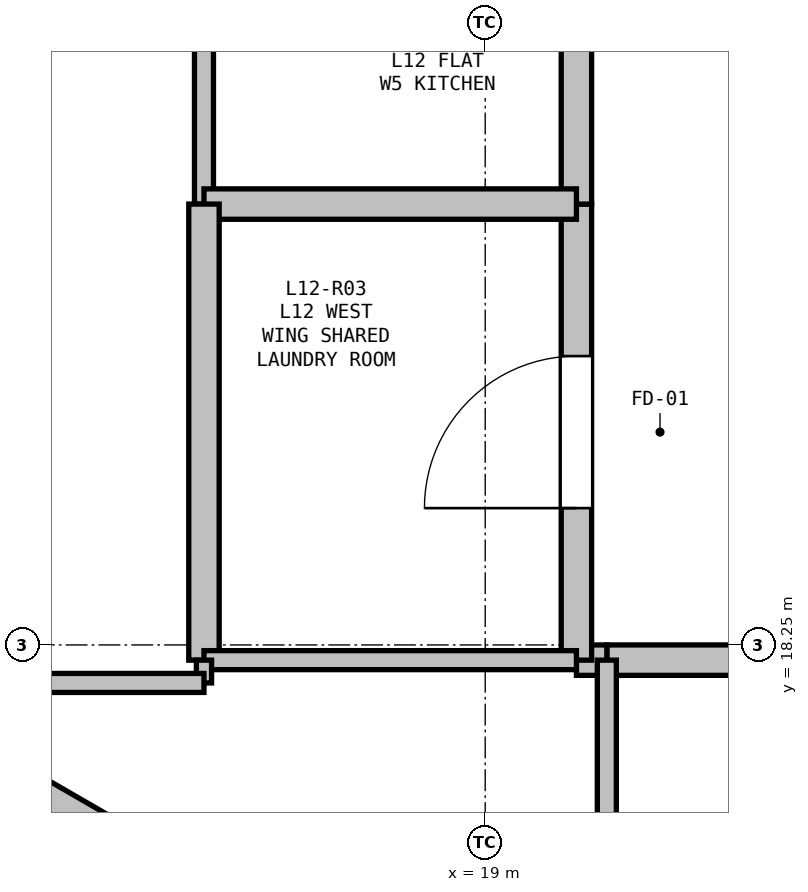
"""IFC4 building model, lengths in metres.
Left out: names, types, materials, properties, quantities, classifications, styles, units other than length and angle.
Written with IfcOpenShell. Run it as: python <this file> out.ifc"""

import sys

from ifc_helpers import new_model, si_unit, direction, frame, frame_2d, origin, place, context, subcontext, project, spatial, rectangle, extrude, element, fill, save


model = new_model("IFC4")
c1 = context("Model", 3, precision=1e-05, world=origin(), true_north=direction((0.0, 1.0)))
c2 = subcontext(c1, "Body", "Model", "MODEL_VIEW")
j1 = project(units=[si_unit("LENGTHUNIT", "METRE"), si_unit("PLANEANGLEUNIT", "RADIAN")], contexts=[c1])
p1 = place(None, origin())
s1 = spatial("IfcSite", under=j1, at=p1, CompositionType="ELEMENT")
p2 = place(p1, origin())
s2 = spatial("IfcBuilding", under=s1, at=p2, CompositionType="ELEMENT")
p3 = place(p2, frame((0.0, 0.0, 45.6)))
s3 = spatial("IfcBuildingStorey", under=s2, at=p3, CompositionType="ELEMENT", Elevation=45.6)
p4 = place(p3, frame((16.48, 17.039, 0.0), z_axis=(0.0, 0.0, 1.0), x_axis=(-0.86605165483, 0.499954529098, 0.0)))
e1 = element("IfcWall", 1, at=p4, inside=s3, PredefinedType="PARAPET", context=c2, shape_type="SweptSolid", body=[
    extrude(rectangle(XDim=1.7, YDim=0.2, at=frame_2d((0.85, 0.0))), origin(), (0.0, 0.0, 1.0), 2.66),
])
p5 = place(p3, frame((22.6, 18.15, 0.0), z_axis=(0.0, 0.0, 1.0), x_axis=(-1.0, 0.0, 0.0)))
e2 = element("IfcWall", 2, at=p5, inside=s3, PredefinedType="PARTITIONING", context=c2, shape_type="SweptSolid", body=[
    extrude(rectangle(XDim=2.8, YDim=0.2, at=frame_2d((1.4, 0.0))), origin(), (0.0, 0.0, 1.0), 3.04),
])
p6 = place(p5, frame((0.9, 0.0, 0.0)))
e3 = element("IfcOpeningElement", 3, at=p6, cuts=e2, PredefinedType="OPENING", context=c2, shape_type="SweptSolid", body=[
    extrude(rectangle(XDim=1.0, YDim=2.15, at=frame_2d((0.5, 1.075))), frame((0.0, 0.11, 0.0), z_axis=(0.0, -1.0, 0.0), x_axis=(1.0, 0.0, 0.0)), (0.0, 0.0, 1.0), 0.22),
])
p7 = place(p3, frame((19.8, 18.15, 0.0), z_axis=(0.0, 0.0, 1.0), x_axis=(-1.0, 0.0, 0.0)))
e4 = element("IfcWall", 4, at=p7, inside=s3, PredefinedType="PARTITIONING", context=c2, shape_type="SweptSolid", body=[
    extrude(rectangle(XDim=0.2, YDim=0.2, at=frame_2d((0.1, 0.0))), origin(), (0.0, 0.0, 1.0), 3.04),
])
p8 = place(p3, frame((19.6, 18.15, 0.0), z_axis=(0.0, 0.0, 1.0), x_axis=(0.0, 1.0, 0.0)))
e5 = element("IfcWall", 5, at=p8, inside=s3, PredefinedType="PARTITIONING", context=c2, shape_type="SweptSolid", body=[
    extrude(rectangle(XDim=3.0, YDim=0.2, at=frame_2d((1.5, 0.0))), origin(), (0.0, 0.0, 1.0), 2.337),
])
p9 = place(p8, frame((1.0, 0.0, 0.0)))
e6 = element("IfcOpeningElement", 6, at=p9, cuts=e5, PredefinedType="OPENING", context=c2, shape_type="SweptSolid", body=[
    extrude(rectangle(XDim=1.0, YDim=2.15, at=frame_2d((0.5, 1.075))), frame((0.0, 0.11, 0.0), z_axis=(0.0, -1.0, 0.0), x_axis=(1.0, 0.0, 0.0)), (0.0, 0.0, 1.0), 0.22),
])
p10 = place(p3, frame((19.6, 21.15, 0.0), z_axis=(0.0, 0.0, 1.0), x_axis=(0.0, 1.0, 0.0)))
e7 = element("IfcWall", 7, at=p10, inside=s3, PredefinedType="PARTITIONING", context=c2, shape_type="SweptSolid", body=[
    extrude(rectangle(XDim=4.0, YDim=0.2, at=frame_2d((2.0, 0.0))), origin(), (0.0, 0.0, 1.0), 3.04),
])
p11 = place(p3, frame((17.15, 21.15, 0.0), z_axis=(0.0, 0.0, 1.0), x_axis=(0.0, 1.0, 0.0)))
e8 = element("IfcWall", 8, at=p11, inside=s3, PredefinedType="PARTITIONING", context=c2, shape_type="SweptSolid", body=[
    extrude(rectangle(XDim=4.0, YDim=0.125, at=frame_2d((2.0, 0.0))), origin(), (0.0, 0.0, 1.0), 2.337),
])
p12 = place(p11, frame((1.525, 0.0, 0.0)))
e9 = element("IfcOpeningElement", 9, at=p12, cuts=e8, PredefinedType="OPENING", context=c2, shape_type="SweptSolid", body=[
    extrude(rectangle(XDim=0.95, YDim=2.1, at=frame_2d((0.475, 1.05))), frame((0.0, 0.073, 0.0), z_axis=(0.0, -1.0, 0.0), x_axis=(1.0, 0.0, 0.0)), (0.0, 0.0, 1.0), 0.145),
])
p13 = place(p3, frame((19.6, 21.15, 0.0), z_axis=(0.0, 0.0, 1.0), x_axis=(-1.0, 0.0, 0.0)))
e10 = element("IfcWall", 10, at=p13, inside=s3, PredefinedType="PARTITIONING", context=c2, shape_type="SweptSolid", body=[
    extrude(rectangle(XDim=2.45, YDim=0.2, at=frame_2d((1.225, 0.0))), origin(), (0.0, 0.0, 1.0), 2.337),
])
p14 = place(p3, frame((17.15, 18.15, 0.0), z_axis=(0.0, 0.0, 1.0), x_axis=(0.0, 1.0, 0.0)))
e11 = element("IfcWall", 11, at=p14, inside=s3, PredefinedType="PARTITIONING", context=c2, shape_type="SweptSolid", body=[
    extrude(rectangle(XDim=3.0, YDim=0.2, at=frame_2d((1.5, 0.0))), origin(), (0.0, 0.0, 1.0), 3.04),
])
p15 = place(p3, frame((19.6, 18.15, 0.0), z_axis=(0.0, 0.0, 1.0), x_axis=(-1.0, 0.0, 0.0)))
e12 = element("IfcWall", 12, at=p15, inside=s3, PredefinedType="PARTITIONING", context=c2, shape_type="SweptSolid", body=[
    extrude(rectangle(XDim=2.45, YDim=0.125, at=frame_2d((1.225, 0.0))), origin(), (0.0, 0.0, 1.0), 3.04),
])
p16 = place(p3, frame((19.8, 15.75, 0.0), z_axis=(0.0, 0.0, 1.0), x_axis=(0.0, 1.0, 0.0)))
e13 = element("IfcWall", 13, at=p16, inside=s3, PredefinedType="PARTITIONING", context=c2, shape_type="SweptSolid", body=[
    extrude(rectangle(XDim=2.4, YDim=0.125, at=frame_2d((1.2, 0.0))), origin(), (0.0, 0.0, 1.0), 2.65),
])
p17 = place(p3, frame((17.15, 18.15, 0.0), z_axis=(0.0, 0.0, 1.0), x_axis=(0.0, -1.0, 0.0)))
e14 = element("IfcWall", 14, at=p17, inside=s3, PredefinedType="PARTITIONING", context=c2, shape_type="SweptSolid", body=[
    extrude(rectangle(XDim=0.15, YDim=0.1, at=frame_2d((0.075, 0.0))), origin(), (0.0, 0.0, 1.0), 3.04),
])
p18 = place(p3, frame((17.15, 18.0, 0.0), z_axis=(0.0, 0.0, 1.0), x_axis=(-1.0, 0.0, 0.0)))
e15 = element("IfcWall", 15, at=p18, inside=s3, PredefinedType="PARTITIONING", context=c2, shape_type="SweptSolid", body=[
    extrude(rectangle(XDim=2.401, YDim=0.125, at=frame_2d((1.2, 0.0))), origin(), (0.0, 0.0, 1.0), 2.365),
])
p19 = place(p9, origin())
e16 = element("IfcDoor", 16, at=p19, inside=s3, OperationType="SINGLE_SWING_LEFT", PredefinedType="DOOR", context=c2, shape_type="SweptSolid", body=[
    extrude(rectangle(XDim=1.0, YDim=2.15, at=frame_2d((0.5, 1.075))), frame((0.0, 0.025, 0.0), z_axis=(0.0, -1.0, 0.0), x_axis=(1.0, 0.0, 0.0)), (0.0, 0.0, 1.0), 0.05),
])
fill(e6, e16)
save(model, sys.argv[1])
